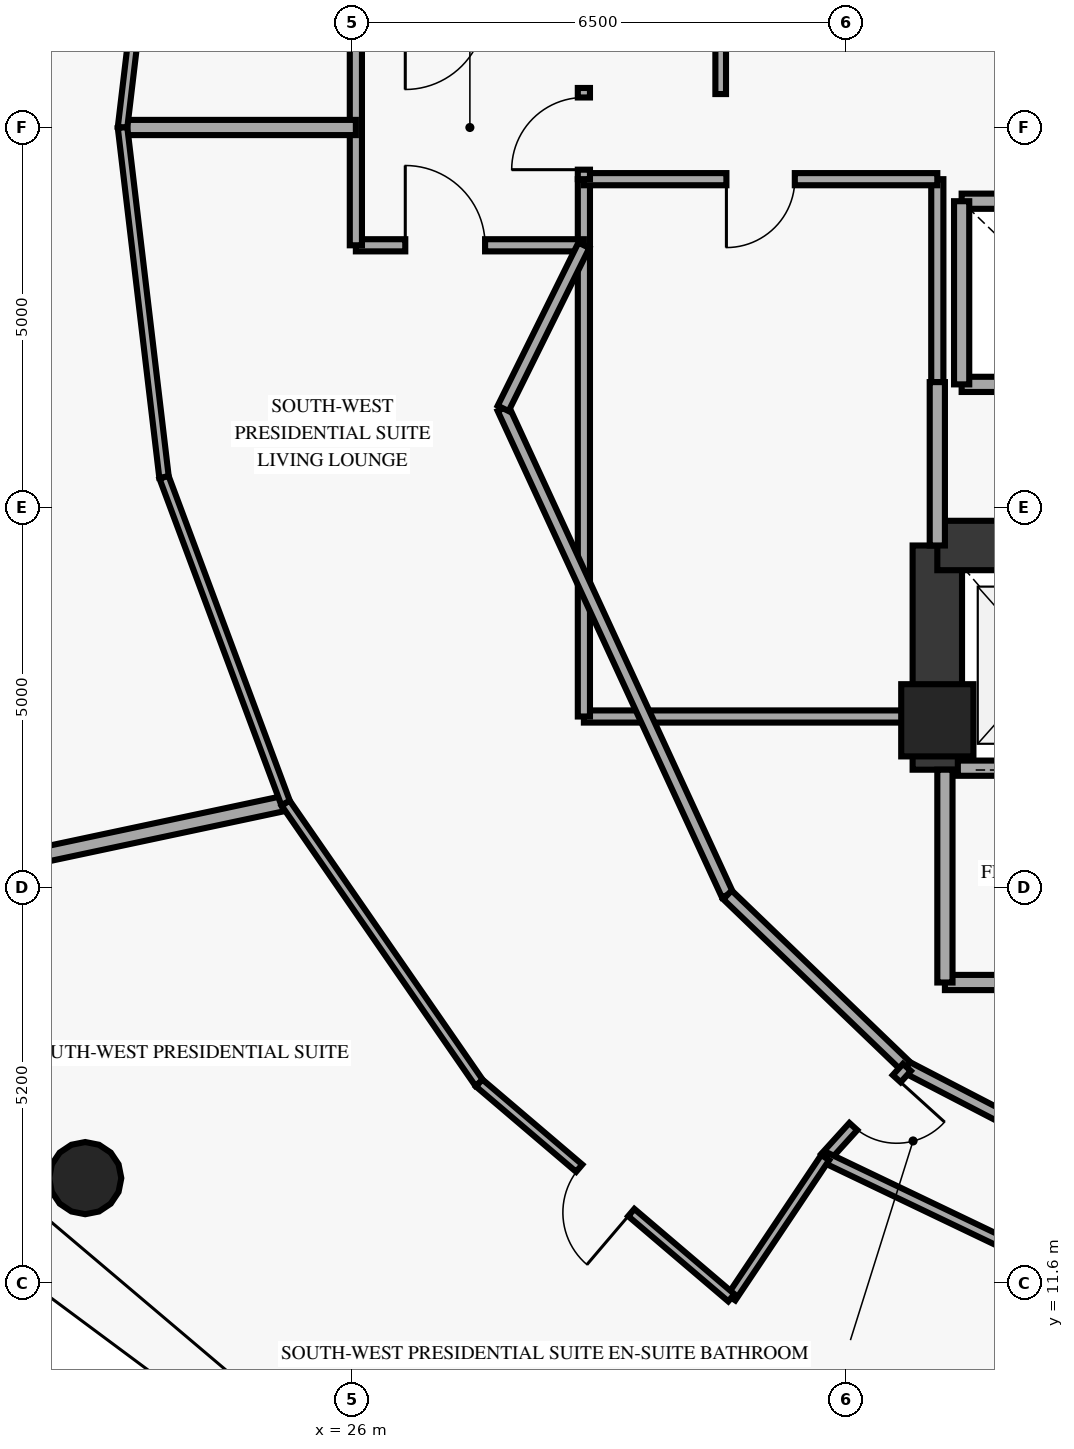
"""IFC4 building model, lengths in metres.
Left out: names, types, materials, properties, quantities, classifications, styles, units other than length and angle.
Written with IfcOpenShell. Run it as: python <this file> out.ifc"""

import sys

from ifc_helpers import new_model, si_unit, direction, frame, frame_2d, origin, origin_2d, place, context, subcontext, project, spatial, rectangle, circle, extrude, element, fill, save


model = new_model("IFC4")
c1 = context("Model", 3, precision=1e-05, world=origin(), true_north=direction((0.0, 1.0)))
c2 = subcontext(c1, "Body", "Model", "MODEL_VIEW")
j1 = project(units=[si_unit("LENGTHUNIT", "METRE"), si_unit("PLANEANGLEUNIT", "RADIAN")], contexts=[c1])
p1 = place(None, origin())
s1 = spatial("IfcSite", under=j1, at=p1, CompositionType="ELEMENT")
p2 = place(p1, origin())
s2 = spatial("IfcBuilding", under=s1, at=p2, CompositionType="ELEMENT")
p3 = place(p2, frame((0.0, 0.0, 192.25)))
s3 = spatial("IfcBuildingStorey", under=s2, at=p3, CompositionType="ELEMENT", Elevation=192.25)
p4 = place(p3, frame((33.7, 19.0, 0.0), z_axis=(0.0, 0.0, 1.0), x_axis=(1.0, 0.0, 0.0)))
e1 = element("IfcColumn", 1, at=p4, inside=s3, PredefinedType="PILASTER", context=c2, shape_type="SweptSolid", body=[
    extrude(rectangle(XDim=0.95, YDim=0.95, at=origin_2d()), origin(), (0.0, 0.0, 1.0), 3.35),
])
p5 = place(p3, frame((22.489, 12.976, 0.0), z_axis=(0.0, 0.0, 1.0), x_axis=(1.0, 0.0, 0.0)))
e2 = element("IfcColumn", 2, at=p5, inside=s3, PredefinedType="COLUMN", context=c2, shape_type="SweptSolid", body=[
    extrude(circle(Radius=0.475, at=origin_2d()), origin(), (0.0, 0.0, 1.0), 3.35),
])
p6 = place(p3, frame((33.7, 18.35, 0.0), z_axis=(0.0, 0.0, 1.0), x_axis=(0.0, 1.0, 0.0)))
e3 = element("IfcWall", 3, at=p6, inside=s3, PredefinedType="SHEAR", context=c2, shape_type="SweptSolid", body=[
    extrude(rectangle(XDim=2.95, YDim=0.65, at=frame_2d((1.475, 0.0))), origin(), (0.0, 0.0, 1.0), 3.35),
])
p7 = place(p3, frame((33.7, 21.3, 0.0), z_axis=(0.0, 0.0, 1.0), x_axis=(1.0, 0.0, 0.0)))
e4 = element("IfcWall", 4, at=p7, inside=s3, PredefinedType="SHEAR", context=c2, shape_type="SweptSolid", body=[
    extrude(rectangle(XDim=7.55, YDim=0.65, at=frame_2d((3.775, 0.0))), origin(), (0.0, 0.0, 1.0), 3.35),
])
for number, where, z_axis, x_axis in (
    (5, (34.02, 23.42, 0.0), (0.0, 0.0, 1.0), (1.0, 0.0, 0.0)),
    (6, (34.02, 25.83, 0.0), (0.0, 0.0, 1.0), (1.0, 0.0, 0.0)),
):
    element("IfcWall", number, at=place(p3, frame(where, z_axis=z_axis, x_axis=x_axis)), inside=s3, PredefinedType="SOLIDWALL", context=c2, shape_type="SweptSolid", body=[
        extrude(rectangle(XDim=2.5, YDim=0.2, at=frame_2d((1.25, 0.0))), origin(), (0.0, 0.0, 1.0), 3.35),
    ])
p8 = place(p3, frame((34.02, 23.42, 0.0), z_axis=(0.0, 0.0, 1.0), x_axis=(0.0, 1.0, 0.0)))
e7 = element("IfcWall", 7, at=p8, inside=s3, PredefinedType="SOLIDWALL", context=c2, shape_type="SweptSolid", body=[
    extrude(rectangle(XDim=2.41, YDim=0.2, at=frame_2d((1.205, 0.0))), origin(), (0.0, 0.0, 1.0), 3.35),
])
p9 = place(p3, frame((33.97, 18.37, 0.0), z_axis=(0.0, 0.0, 1.0), x_axis=(1.0, 0.0, 0.0)))
e8 = element("IfcWall", 8, at=p9, inside=s3, PredefinedType="SOLIDWALL", context=c2, shape_type="SweptSolid", body=[
    extrude(rectangle(XDim=2.36, YDim=0.2, at=frame_2d((1.18, 0.0))), origin(), (0.0, 0.0, 1.0), 3.35),
])
p10 = place(p9, frame((0.555, 0.0, 0.0)))
e9 = element("IfcOpeningElement", 9, at=p10, cuts=e8, PredefinedType="OPENING", context=c2, shape_type="SweptSolid", body=[
    extrude(rectangle(XDim=1.25, YDim=2.2, at=frame_2d((0.625, 1.1))), frame((0.0, 0.11, 0.0), z_axis=(0.0, -1.0, 0.0), x_axis=(1.0, 0.0, 0.0)), (0.0, 0.0, 1.0), 0.22),
])
p11 = place(p3, frame((29.05, 19.05, 0.0), z_axis=(0.0, 0.0, 1.0), x_axis=(1.0, 0.0, 0.0)))
e10 = element("IfcWall", 10, at=p11, inside=s3, PredefinedType="PARTITIONING", context=c2, shape_type="SweptSolid", body=[
    extrude(rectangle(XDim=4.65, YDim=0.16, at=frame_2d((2.325, 0.0))), origin(), (0.0, 0.0, 1.0), 3.35),
])
p12 = place(p3, frame((29.05, 19.05, 0.0), z_axis=(0.0, 0.0, 1.0), x_axis=(0.0, 1.0, 0.0)))
e11 = element("IfcWall", 11, at=p12, inside=s3, PredefinedType="PARTITIONING", context=c2, shape_type="SweptSolid", body=[
    extrude(rectangle(XDim=7.07, YDim=0.16, at=frame_2d((3.535, 0.0))), origin(), (0.0, 0.0, 1.0), 3.35),
])
p13 = place(p3, frame((33.7, 23.45, 0.0), z_axis=(0.0, 0.0, 1.0), x_axis=(0.0, 1.0, 0.0)))
e12 = element("IfcWall", 12, at=p13, inside=s3, PredefinedType="PARTITIONING", context=c2, shape_type="SweptSolid", body=[
    extrude(rectangle(XDim=2.67, YDim=0.16, at=frame_2d((1.335, 0.0))), origin(), (0.0, 0.0, 1.0), 2.735),
])
p14 = place(p3, frame((33.7, 26.12, 0.0), z_axis=(0.0, 0.0, 1.0), x_axis=(-1.0, 0.0, 0.0)))
e13 = element("IfcWall", 13, at=p14, inside=s3, PredefinedType="PARTITIONING", context=c2, shape_type="SweptSolid", body=[
    extrude(rectangle(XDim=4.65, YDim=0.16, at=frame_2d((2.325, 0.0))), origin(), (0.0, 0.0, 1.0), 3.35),
])
p15 = place(p14, frame((1.875, 0.0, 0.0)))
e14 = element("IfcOpeningElement", 14, at=p15, cuts=e13, PredefinedType="OPENING", context=c2, shape_type="SweptSolid", body=[
    extrude(rectangle(XDim=0.9, YDim=2.1, at=frame_2d((0.45, 1.05))), frame((0.0, 0.09, 0.0), z_axis=(0.0, -1.0, 0.0), x_axis=(1.0, 0.0, 0.0)), (0.0, 0.0, 1.0), 0.18),
])
p16 = place(p3, frame((33.7, 21.3, 0.0), z_axis=(0.0, 0.0, 1.0), x_axis=(0.0, 1.0, 0.0)))
e15 = element("IfcWall", 15, at=p16, inside=s3, PredefinedType="SOLIDWALL", context=c2, shape_type="SweptSolid", body=[
    extrude(rectangle(XDim=2.15, YDim=0.2, at=frame_2d((1.075, 0.0))), origin(), (0.0, 0.0, 1.0), 2.735),
])
p17 = place(p3, frame((33.8, 15.55, 0.0), z_axis=(0.0, 0.0, 1.0), x_axis=(1.0, 0.0, 0.0)))
e16 = element("IfcWall", 16, at=p17, inside=s3, PredefinedType="SOLIDWALL", context=c2, shape_type="SweptSolid", body=[
    extrude(rectangle(XDim=7.55, YDim=0.2, at=frame_2d((3.775, 0.0))), origin(), (0.0, 0.0, 1.0), 3.35),
])
p18 = place(p3, frame((33.8, 15.55, 0.0), z_axis=(0.0, 0.0, 1.0), x_axis=(0.0, 1.0, 0.0)))
e17 = element("IfcWall", 17, at=p18, inside=s3, PredefinedType="SOLIDWALL", context=c2, shape_type="SweptSolid", body=[
    extrude(rectangle(XDim=2.8, YDim=0.2, at=frame_2d((1.4, 0.0))), origin(), (0.0, 0.0, 1.0), 3.35),
])
p19 = place(p3, frame((29.05, 26.12, 0.0), z_axis=(0.0, 0.0, 1.0), x_axis=(0.0, 1.0, 0.0)))
e18 = element("IfcWall", 18, at=p19, inside=s3, PredefinedType="PARTITIONING", context=c2, shape_type="SweptSolid", body=[
    extrude(rectangle(XDim=1.2, YDim=0.16, at=frame_2d((0.6, 0.0))), origin(), (0.0, 0.0, 1.0), 3.35),
])
p20 = place(p19, frame((0.125, 0.0, 0.0)))
e19 = element("IfcOpeningElement", 19, at=p20, cuts=e18, PredefinedType="OPENING", context=c2, shape_type="SweptSolid", body=[
    extrude(rectangle(XDim=0.95, YDim=2.15, at=frame_2d((0.475, 1.075))), frame((0.0, 0.09, 0.0), z_axis=(0.0, -1.0, 0.0), x_axis=(1.0, 0.0, 0.0)), (0.0, 0.0, 1.0), 0.18),
])
p21 = place(p3, frame((30.85, 27.24, 0.0), z_axis=(0.0, 0.0, 1.0), x_axis=(0.0, 1.0, 0.0)))
e20 = element("IfcWall", 20, at=p21, inside=s3, PredefinedType="PARTITIONING", context=c2, shape_type="SweptSolid", body=[
    extrude(rectangle(XDim=1.81, YDim=0.14, at=frame_2d((0.905, 0.0))), origin(), (0.0, 0.0, 1.0), 3.35),
])
p22 = place(p3, frame((27.988, 23.104, 0.0), z_axis=(0.0, 0.0, 1.0), x_axis=(0.418656179426, -0.908144814128, 0.0)))
e21 = element("IfcWall", 21, at=p22, inside=s3, PredefinedType="PARTITIONING", context=c2, shape_type="SweptSolid", body=[
    extrude(rectangle(XDim=7.049, YDim=0.16, at=frame_2d((3.524, 0.0))), origin(), (0.0, 0.0, 1.0), 3.35),
])
p23 = place(p3, frame((30.939, 16.703, 0.0), z_axis=(0.0, 0.0, 1.0), x_axis=(0.72090897908, -0.693029756851, 0.0)))
e22 = element("IfcWall", 22, at=p23, inside=s3, PredefinedType="PARTITIONING", context=c2, shape_type="SweptSolid", body=[
    extrude(rectangle(XDim=3.275, YDim=0.16, at=frame_2d((1.638, 0.0))), origin(), (0.0, 0.0, 1.0), 3.35),
])
p24 = place(p3, frame((33.3, 14.433, 0.0), z_axis=(0.0, 0.0, 1.0), x_axis=(0.887674575788, -0.460471331898, 0.0)))
e23 = element("IfcWall", 23, at=p24, inside=s3, PredefinedType="PARTITIONING", context=c2, shape_type="SweptSolid", body=[
    extrude(rectangle(XDim=3.097, YDim=0.16, at=frame_2d((1.548, 0.0))), origin(), (0.0, 0.0, 1.0), 3.35),
])
p25 = place(p3, frame((26.05, 25.25, 0.0), z_axis=(0.0, 0.0, 1.0), x_axis=(1.0, 0.0, 0.0)))
e24 = element("IfcWall", 24, at=p25, inside=s3, PredefinedType="PARTITIONING", context=c2, shape_type="SweptSolid", body=[
    extrude(rectangle(XDim=3.0, YDim=0.16, at=frame_2d((1.5, 0.0))), origin(), (0.0, 0.0, 1.0), 3.35),
])
p26 = place(p25, frame((0.65, 0.0, 0.0)))
e25 = element("IfcOpeningElement", 25, at=p26, cuts=e24, PredefinedType="OPENING", context=c2, shape_type="SweptSolid", body=[
    extrude(rectangle(XDim=1.05, YDim=2.15, at=frame_2d((0.525, 1.075))), frame((0.0, 0.09, 0.0), z_axis=(0.0, -1.0, 0.0), x_axis=(1.0, 0.0, 0.0)), (0.0, 0.0, 1.0), 0.18),
])
p27 = place(p3, frame((26.05, 25.25, 0.0), z_axis=(0.0, 0.0, 1.0), x_axis=(0.0, 1.0, 0.0)))
e26 = element("IfcWall", 26, at=p27, inside=s3, PredefinedType="PARTITIONING", context=c2, shape_type="SweptSolid", body=[
    extrude(rectangle(XDim=3.1, YDim=0.16, at=frame_2d((1.55, 0.0))), origin(), (0.0, 0.0, 1.0), 3.35),
])
p28 = place(p3, frame((27.988, 23.104, 0.0), z_axis=(0.0, 0.0, 1.0), x_axis=(0.443539160525, 0.896254993337, 0.0)))
e27 = element("IfcWall", 27, at=p28, inside=s3, PredefinedType="PARTITIONING", context=c2, shape_type="SweptSolid", body=[
    extrude(rectangle(XDim=2.394, YDim=0.16, at=frame_2d((1.197, 0.0))), origin(), (0.0, 0.0, 1.0), 3.35),
])
p29 = place(p3, frame((26.05, 26.8, 0.0), z_axis=(0.0, 0.0, 1.0), x_axis=(-1.0, 0.0, 0.0)))
e28 = element("IfcWall", 28, at=p29, inside=s3, PredefinedType="PARTITIONING", context=c2, shape_type="SweptSolid", body=[
    extrude(rectangle(XDim=3.07, YDim=0.2, at=frame_2d((1.535, 0.0))), origin(), (0.0, 0.0, 1.0), 3.35),
])
p30 = place(p3, frame((25.126, 17.91, 0.0), z_axis=(0.0, 0.0, 1.0), x_axis=(-0.978119354701, -0.208044533596, 0.0)))
e29 = element("IfcWall", 29, at=p30, inside=s3, PredefinedType="PARTITIONING", context=c2, shape_type="SweptSolid", body=[
    extrude(rectangle(XDim=7.796, YDim=0.2, at=frame_2d((3.898, 0.0))), origin(), (0.0, 0.0, 1.0), 3.35),
])
p31 = place(p3, frame((23.526, 31.402, 0.0), z_axis=(0.0, 0.0, 1.0), x_axis=(-0.117794846718, -0.993037951987, 0.0)))
e30 = element("IfcWall", 30, at=p31, inside=s3, PredefinedType="PARTITIONING", context=c2, shape_type="SweptSolid", body=[
    extrude(rectangle(XDim=4.634, YDim=0.125, at=frame_2d((2.317, 0.0))), origin(), (0.0, 0.0, 1.0), 3.35),
])
p32 = place(p3, frame((33.3, 14.433, 0.0), z_axis=(0.0, 0.0, 1.0), x_axis=(-0.671556062003, -0.740953747266, 0.0)))
e31 = element("IfcWall", 31, at=p32, inside=s3, PredefinedType="PARTITIONING", context=c2, shape_type="SweptSolid", body=[
    extrude(rectangle(XDim=1.601, YDim=0.14, at=frame_2d((0.8, 0.0))), origin(), (0.0, 0.0, 1.0), 3.35),
])
p33 = place(p32, frame((0.2, 0.0, 0.0)))
e32 = element("IfcOpeningElement", 32, at=p33, cuts=e31, PredefinedType="OPENING", context=c2, shape_type="SweptSolid", body=[
    extrude(rectangle(XDim=0.85, YDim=2.1, at=frame_2d((0.425, 1.05))), frame((0.0, 0.08, 0.0), z_axis=(0.0, -1.0, 0.0), x_axis=(1.0, 0.0, 0.0)), (0.0, 0.0, 1.0), 0.16),
])
p34 = place(p3, frame((32.225, 13.247, 0.0), z_axis=(0.0, 0.0, 1.0), x_axis=(0.902016722043, -0.431701092372, 0.0)))
e33 = element("IfcWall", 33, at=p34, inside=s3, PredefinedType="PARTITIONING", context=c2, shape_type="SweptSolid", body=[
    extrude(rectangle(XDim=3.623, YDim=0.14, at=frame_2d((1.812, 0.0))), origin(), (0.0, 0.0, 1.0), 3.35),
])
p35 = place(p3, frame((32.225, 13.247, 0.0), z_axis=(0.0, 0.0, 1.0), x_axis=(-0.556297850913, -0.830982972791, 0.0)))
e34 = element("IfcWall", 34, at=p35, inside=s3, PredefinedType="PARTITIONING", context=c2, shape_type="SweptSolid", body=[
    extrude(rectangle(XDim=2.22, YDim=0.125, at=frame_2d((1.11, 0.0))), origin(), (0.0, 0.0, 1.0), 3.35),
])
p36 = place(p3, frame((22.98, 26.8, 0.0), z_axis=(0.0, 0.0, 1.0), x_axis=(0.117794846718, -0.993037951987, 0.0)))
e35 = element("IfcWall", 35, at=p36, inside=s3, PredefinedType="PARTITIONING", context=c2, shape_type="SweptSolid", body=[
    extrude(rectangle(XDim=4.634, YDim=0.125, at=frame_2d((2.317, 0.0))), origin(), (0.0, 0.0, 1.0), 3.35),
])
p37 = place(p3, frame((23.526, 22.198, 0.0), z_axis=(0.0, 0.0, 1.0), x_axis=(0.349603098964, -0.936897899024, 0.0)))
e36 = element("IfcWall", 36, at=p37, inside=s3, PredefinedType="PARTITIONING", context=c2, shape_type="SweptSolid", body=[
    extrude(rectangle(XDim=4.577, YDim=0.125, at=frame_2d((2.289, 0.0))), origin(), (0.0, 0.0, 1.0), 3.35),
])
p38 = place(p3, frame((25.126, 17.91, 0.0), z_axis=(0.0, 0.0, 1.0), x_axis=(0.568778830708, -0.822490511641, 0.0)))
e37 = element("IfcWall", 37, at=p38, inside=s3, PredefinedType="PARTITIONING", context=c2, shape_type="SweptSolid", body=[
    extrude(rectangle(XDim=4.477, YDim=0.125, at=frame_2d((2.238, 0.0))), origin(), (0.0, 0.0, 1.0), 3.35),
])
p39 = place(p3, frame((27.672, 14.228, 0.0), z_axis=(0.0, 0.0, 1.0), x_axis=(0.76128931679, -0.648412350393, 0.0)))
e38 = element("IfcWall", 38, at=p39, inside=s3, PredefinedType="PARTITIONING", context=c2, shape_type="SweptSolid", body=[
    extrude(rectangle(XDim=4.358, YDim=0.125, at=frame_2d((2.179, 0.0))), origin(), (0.0, 0.0, 1.0), 3.35),
])
p40 = place(p39, frame((1.729, 0.0, 0.0)))
e39 = element("IfcOpeningElement", 39, at=p40, cuts=e38, PredefinedType="OPENING", context=c2, shape_type="SweptSolid", body=[
    extrude(rectangle(XDim=0.9, YDim=2.1, at=frame_2d((0.45, 1.05))), frame((0.0, 0.073, 0.0), z_axis=(0.0, -1.0, 0.0), x_axis=(1.0, 0.0, 0.0)), (0.0, 0.0, 1.0), 0.145),
])
p41 = place(p15, origin())
e40 = element("IfcDoor", 40, at=p41, inside=s3, OperationType="SINGLE_SWING_RIGHT", PredefinedType="DOOR", context=c2, shape_type="SweptSolid", body=[
    extrude(rectangle(XDim=0.9, YDim=2.1, at=frame_2d((0.45, 1.05))), frame((0.0, 0.025, 0.0), z_axis=(0.0, -1.0, 0.0), x_axis=(1.0, 0.0, 0.0)), (0.0, 0.0, 1.0), 0.05),
])
fill(e14, e40)
p42 = place(p20, origin())
e41 = element("IfcDoor", 41, at=p42, inside=s3, OperationType="SINGLE_SWING_RIGHT", PredefinedType="DOOR", context=c2, shape_type="SweptSolid", body=[
    extrude(rectangle(XDim=0.95, YDim=2.15, at=frame_2d((0.475, 1.075))), frame((0.0, 0.025, 0.0), z_axis=(0.0, -1.0, 0.0), x_axis=(1.0, 0.0, 0.0)), (0.0, 0.0, 1.0), 0.05),
])
fill(e19, e41)
p43 = place(p26, origin())
e42 = element("IfcDoor", 42, at=p43, inside=s3, OperationType="SINGLE_SWING_LEFT", PredefinedType="DOOR", context=c2, shape_type="SweptSolid", body=[
    extrude(rectangle(XDim=1.05, YDim=2.15, at=frame_2d((0.525, 1.075))), frame((0.0, 0.025, 0.0), z_axis=(0.0, -1.0, 0.0), x_axis=(1.0, 0.0, 0.0)), (0.0, 0.0, 1.0), 0.05),
])
fill(e25, e42)
p44 = place(p33, origin())
e43 = element("IfcDoor", 43, at=p44, inside=s3, OperationType="SINGLE_SWING_LEFT", PredefinedType="DOOR", context=c2, shape_type="SweptSolid", body=[
    extrude(rectangle(XDim=0.85, YDim=2.1, at=frame_2d((0.425, 1.05))), frame((0.0, 0.025, 0.0), z_axis=(0.0, -1.0, 0.0), x_axis=(1.0, 0.0, 0.0)), (0.0, 0.0, 1.0), 0.05),
])
fill(e32, e43)
p45 = place(p40, origin())
e44 = element("IfcDoor", 44, at=p45, inside=s3, OperationType="SINGLE_SWING_RIGHT", PredefinedType="DOOR", context=c2, shape_type="SweptSolid", body=[
    extrude(rectangle(XDim=0.9, YDim=2.1, at=frame_2d((0.45, 1.05))), frame((0.0, 0.025, 0.0), z_axis=(0.0, -1.0, 0.0), x_axis=(1.0, 0.0, 0.0)), (0.0, 0.0, 1.0), 0.05),
])
fill(e39, e44)
save(model, sys.argv[1])
